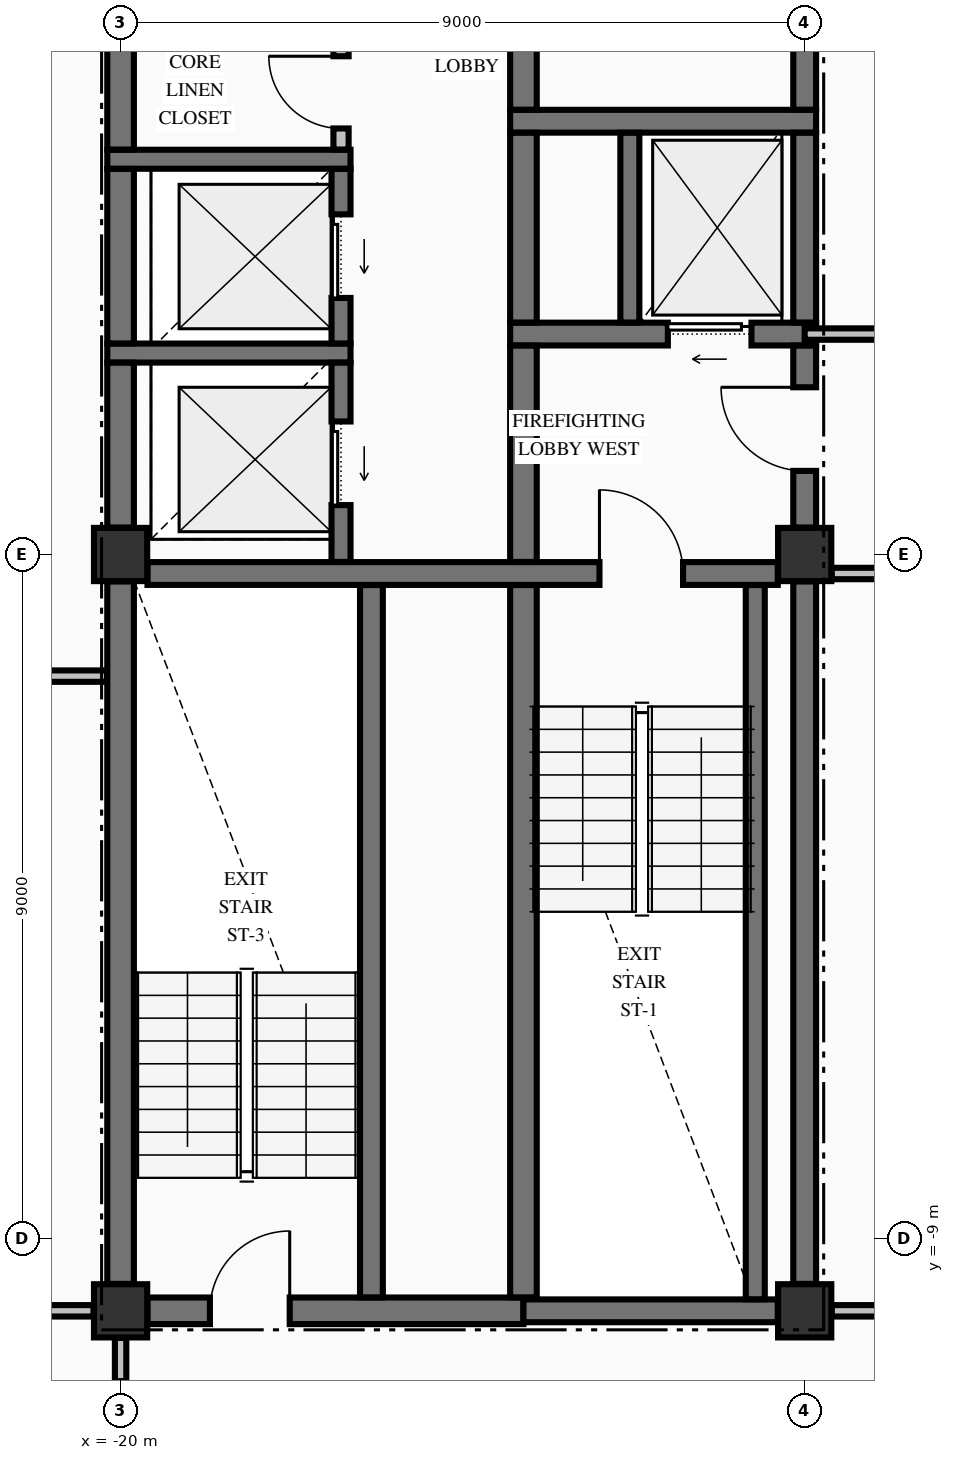
"""IFC4 building model, lengths in metres.
Left out: names, types, materials, properties, quantities, classifications, styles, units other than length and angle.
Written with IfcOpenShell. Run it as: python <this file> out.ifc"""

import sys

from ifc_helpers import new_model, si_unit, direction, frame, frame_2d, origin, origin_2d, place, context, subcontext, project, spatial, rectangle, extrude, element, fill, save


model = new_model("IFC4")
c1 = context("Model", 3, precision=1e-05, world=origin(), true_north=direction((0.0, 1.0)))
c2 = subcontext(c1, "Body", "Model", "MODEL_VIEW")
j1 = project(units=[si_unit("LENGTHUNIT", "METRE"), si_unit("PLANEANGLEUNIT", "RADIAN")], contexts=[c1])
p1 = place(None, origin())
s1 = spatial("IfcSite", under=j1, at=p1, CompositionType="ELEMENT")
p2 = place(p1, origin())
s2 = spatial("IfcBuilding", under=s1, at=p2, CompositionType="ELEMENT")
p3 = place(p2, frame((0.0, 0.0, 257.66)))
s3 = spatial("IfcBuildingStorey", under=s2, at=p3, CompositionType="ELEMENT", Elevation=257.66)
for number, where, z_axis, x_axis in (
    (1, (-20.0, -9.95, -0.25), (0.0, 0.0, 1.0), (1.0, 0.0, 0.0)),
    (2, (-11.0, -9.95, -0.25), (0.0, 0.0, 1.0), (1.0, 0.0, 0.0)),
    (3, (-11.0, 0.0, -0.25), (0.0, 0.0, 1.0), (1.0, 0.0, 0.0)),
    (4, (-20.0, 0.0, -0.25), (0.0, 0.0, 1.0), (1.0, 0.0, 0.0)),
):
    element("IfcColumn", number, at=place(p3, frame(where, z_axis=z_axis, x_axis=x_axis)), inside=s3, PredefinedType="COLUMN", context=c2, shape_type="SweptSolid", body=[
        extrude(rectangle(XDim=0.7, YDim=0.7, at=origin_2d()), origin(), (0.0, 0.0, 1.0), 3.23),
    ])
p4 = place(p3, frame((-19.646, -9.95, 0.0), z_axis=(0.0, 0.0, 1.0), x_axis=(1.0, 0.0, 0.0)))
e5 = element("IfcWall", 5, at=p4, inside=s3, PredefinedType="SHEAR", context=c2, shape_type="SweptSolid", body=[
    extrude(rectangle(XDim=4.946, YDim=0.35, at=frame_2d((2.473, 0.0))), origin(), (0.0, 0.0, 1.0), 2.98),
])
p5 = place(p4, frame((0.821, 0.0, 0.0)))
e6 = element("IfcOpeningElement", 6, at=p5, cuts=e5, PredefinedType="OPENING", context=c2, shape_type="SweptSolid", body=[
    extrude(rectangle(XDim=1.05, YDim=2.15, at=frame_2d((0.525, 1.075))), frame((0.0, 0.185, 0.0), z_axis=(0.0, -1.0, 0.0), x_axis=(1.0, 0.0, 0.0)), (0.0, 0.0, 1.0), 0.37),
])
p6 = place(p3, frame((-14.7, -9.95, 0.0), z_axis=(0.0, 0.0, 1.0), x_axis=(1.0, 0.0, 0.0)))
e7 = element("IfcWall", 7, at=p6, inside=s3, PredefinedType="SHEAR", context=c2, shape_type="SweptSolid", body=[
    extrude(rectangle(XDim=3.346, YDim=0.3, at=frame_2d((1.673, 0.0))), origin(), (0.0, 0.0, 1.0), 2.98),
])
p7 = place(p3, frame((-19.646, -0.25, 0.0), z_axis=(0.0, 0.0, 1.0), x_axis=(1.0, 0.0, 0.0)))
e8 = element("IfcWall", 8, at=p7, inside=s3, PredefinedType="SHEAR", context=c2, shape_type="SweptSolid", body=[
    extrude(rectangle(XDim=8.292, YDim=0.3, at=frame_2d((4.146, 0.0))), origin(), (0.0, 0.0, 1.0), 2.98),
])
p8 = place(p7, frame((5.946, 0.0, 0.0)))
e9 = element("IfcOpeningElement", 9, at=p8, cuts=e8, PredefinedType="OPENING", context=c2, shape_type="SweptSolid", body=[
    extrude(rectangle(XDim=1.1, YDim=2.15, at=frame_2d((0.55, 1.075))), frame((0.0, 0.16, 0.0), z_axis=(0.0, -1.0, 0.0), x_axis=(1.0, 0.0, 0.0)), (0.0, 0.0, 1.0), 0.32),
])
p9 = place(p3, frame((-20.175, 2.65, 0.0), z_axis=(0.0, 0.0, 1.0), x_axis=(1.0, 0.0, 0.0)))
e10 = element("IfcWall", 10, at=p9, inside=s3, PredefinedType="SOLIDWALL", context=c2, shape_type="SweptSolid", body=[
    extrude(rectangle(XDim=3.2, YDim=0.25, at=frame_2d((1.6, 0.0))), origin(), (0.0, 0.0, 1.0), 2.98),
])
p10 = place(p3, frame((-14.875, 2.9, 0.0), z_axis=(0.0, 0.0, 1.0), x_axis=(1.0, 0.0, 0.0)))
e11 = element("IfcWall", 11, at=p10, inside=s3, PredefinedType="SHEAR", context=c2, shape_type="SweptSolid", body=[
    extrude(rectangle(XDim=4.025, YDim=0.3, at=frame_2d((2.012, 0.0))), origin(), (0.0, 0.0, 1.0), 2.98),
])
p11 = place(p10, frame((2.075, 0.0, 0.0)))
e12 = element("IfcOpeningElement", 12, at=p11, cuts=e11, PredefinedType="OPENING", context=c2, shape_type="SweptSolid", body=[
    extrude(rectangle(XDim=1.1, YDim=2.2, at=frame_2d((0.55, 1.1))), frame((0.0, 0.16, 0.0), z_axis=(0.0, -1.0, 0.0), x_axis=(1.0, 0.0, 0.0)), (0.0, 0.0, 1.0), 0.32),
])
p12 = place(p3, frame((-20.175, 5.2, 0.0), z_axis=(0.0, 0.0, 1.0), x_axis=(1.0, 0.0, 0.0)))
e13 = element("IfcWall", 13, at=p12, inside=s3, PredefinedType="SOLIDWALL", context=c2, shape_type="SweptSolid", body=[
    extrude(rectangle(XDim=3.2, YDim=0.25, at=frame_2d((1.6, 0.0))), origin(), (0.0, 0.0, 1.0), 2.98),
])
p13 = place(p3, frame((-14.875, 5.7, 0.0), z_axis=(0.0, 0.0, 1.0), x_axis=(1.0, 0.0, 0.0)))
e14 = element("IfcWall", 14, at=p13, inside=s3, PredefinedType="SHEAR", context=c2, shape_type="SweptSolid", body=[
    extrude(rectangle(XDim=4.025, YDim=0.3, at=frame_2d((2.012, 0.0))), origin(), (0.0, 0.0, 1.0), 2.98),
])
p14 = place(p3, frame((-25.835, -9.95, 0.0), z_axis=(0.0, 0.0, 1.0), x_axis=(1.0, 0.0, 0.0)))
e15 = element("IfcWall", 15, at=p14, inside=s3, PredefinedType="PARTITIONING", context=c2, shape_type="SweptSolid", body=[
    extrude(rectangle(XDim=5.479, YDim=0.15, at=frame_2d((2.74, 0.0))), origin(), (0.0, 0.0, 1.0), 2.98),
])
p15 = place(p14, frame((2.36, 0.0, 0.0)))
e16 = element("IfcOpeningElement", 16, at=p15, cuts=e15, PredefinedType="OPENING", context=c2, shape_type="SweptSolid", body=[
    extrude(rectangle(XDim=0.95, YDim=2.15, at=frame_2d((0.475, 1.075))), frame((0.0, 0.085, 0.0), z_axis=(0.0, -1.0, 0.0), x_axis=(1.0, 0.0, 0.0)), (0.0, 0.0, 1.0), 0.17),
])
p16 = place(p3, frame((-10.644, -9.95, 0.0), z_axis=(0.0, 0.0, 1.0), x_axis=(1.0, 0.0, 0.0)))
e17 = element("IfcWall", 17, at=p16, inside=s3, PredefinedType="PARTITIONING", context=c2, shape_type="SweptSolid", body=[
    extrude(rectangle(XDim=21.288, YDim=0.15, at=frame_2d((10.644, 0.0))), origin(), (0.0, 0.0, 1.0), 2.98),
])
p17 = place(p16, frame((12.744, 0.0, 0.0)))
e18 = element("IfcOpeningElement", 18, at=p17, cuts=e17, PredefinedType="OPENING", context=c2, shape_type="SweptSolid", body=[
    extrude(rectangle(XDim=1.1, YDim=2.15, at=frame_2d((0.55, 1.075))), frame((0.0, 0.085, 0.0), z_axis=(0.0, -1.0, 0.0), x_axis=(1.0, 0.0, 0.0)), (0.0, 0.0, 1.0), 0.17),
])
p18 = place(p16, frame((18.949, 0.0, 0.0)))
e19 = element("IfcOpeningElement", 19, at=p18, cuts=e17, PredefinedType="OPENING", context=c2, shape_type="SweptSolid", body=[
    extrude(rectangle(XDim=0.95, YDim=2.15, at=frame_2d((0.475, 1.075))), frame((0.0, 0.085, 0.0), z_axis=(0.0, -1.0, 0.0), x_axis=(1.0, 0.0, 0.0)), (0.0, 0.0, 1.0), 0.17),
])
p19 = place(p3, frame((-25.835, -1.6, 0.0), z_axis=(0.0, 0.0, 1.0), x_axis=(1.0, 0.0, 0.0)))
e20 = element("IfcWall", 20, at=p19, inside=s3, PredefinedType="PARTITIONING", context=c2, shape_type="SweptSolid", body=[
    extrude(rectangle(XDim=5.657, YDim=0.15, at=frame_2d((2.829, 0.0))), origin(), (0.0, 0.0, 1.0), 2.98),
])
p20 = place(p3, frame((-10.644, -0.25, 0.0), z_axis=(0.0, 0.0, 1.0), x_axis=(1.0, 0.0, 0.0)))
e21 = element("IfcWall", 21, at=p20, inside=s3, PredefinedType="PARTITIONING", context=c2, shape_type="SweptSolid", body=[
    extrude(rectangle(XDim=21.288, YDim=0.15, at=frame_2d((10.644, 0.0))), origin(), (0.0, 0.0, 1.0), 2.98),
])
p21 = place(p20, frame((12.744, 0.0, 0.0)))
e22 = element("IfcOpeningElement", 22, at=p21, cuts=e21, PredefinedType="OPENING", context=c2, shape_type="SweptSolid", body=[
    extrude(rectangle(XDim=1.1, YDim=2.15, at=frame_2d((0.55, 1.075))), frame((0.0, 0.085, 0.0), z_axis=(0.0, -1.0, 0.0), x_axis=(1.0, 0.0, 0.0)), (0.0, 0.0, 1.0), 0.17),
])
p22 = place(p20, frame((5.399, 0.0, 0.0)))
e23 = element("IfcOpeningElement", 23, at=p22, cuts=e21, PredefinedType="OPENING", context=c2, shape_type="SweptSolid", body=[
    extrude(rectangle(XDim=1.05, YDim=2.15, at=frame_2d((0.525, 1.075))), frame((0.0, 0.085, 0.0), z_axis=(0.0, -1.0, 0.0), x_axis=(1.0, 0.0, 0.0)), (0.0, 0.0, 1.0), 0.17),
])
p23 = place(p20, frame((17.549, 0.0, 0.0)))
e24 = element("IfcOpeningElement", 24, at=p23, cuts=e21, PredefinedType="OPENING", context=c2, shape_type="SweptSolid", body=[
    extrude(rectangle(XDim=0.95, YDim=2.15, at=frame_2d((0.475, 1.075))), frame((0.0, 0.085, 0.0), z_axis=(0.0, -1.0, 0.0), x_axis=(1.0, 0.0, 0.0)), (0.0, 0.0, 1.0), 0.17),
])
p24 = place(p3, frame((-11.0, 2.9, 0.0), z_axis=(0.0, 0.0, 1.0), x_axis=(1.0, 0.0, 0.0)))
e25 = element("IfcWall", 25, at=p24, inside=s3, PredefinedType="PARTITIONING", context=c2, shape_type="SweptSolid", body=[
    extrude(rectangle(XDim=22.0, YDim=0.15, at=frame_2d((11.0, 0.0))), origin(), (0.0, 0.0, 1.0), 2.98),
])
p25 = place(p24, frame((13.1, 0.0, 0.0)))
e26 = element("IfcOpeningElement", 26, at=p25, cuts=e25, PredefinedType="OPENING", context=c2, shape_type="SweptSolid", body=[
    extrude(rectangle(XDim=1.1, YDim=2.15, at=frame_2d((0.55, 1.075))), frame((0.0, 0.085, 0.0), z_axis=(0.0, -1.0, 0.0), x_axis=(1.0, 0.0, 0.0)), (0.0, 0.0, 1.0), 0.17),
])
p26 = place(p24, frame((5.755, 0.0, 0.0)))
e27 = element("IfcOpeningElement", 27, at=p26, cuts=e25, PredefinedType="OPENING", context=c2, shape_type="SweptSolid", body=[
    extrude(rectangle(XDim=1.05, YDim=2.15, at=frame_2d((0.525, 1.075))), frame((0.0, 0.085, 0.0), z_axis=(0.0, -1.0, 0.0), x_axis=(1.0, 0.0, 0.0)), (0.0, 0.0, 1.0), 0.17),
])
p27 = place(p24, frame((17.83, 0.0, 0.0)))
e28 = element("IfcOpeningElement", 28, at=p27, cuts=e25, PredefinedType="OPENING", context=c2, shape_type="SweptSolid", body=[
    extrude(rectangle(XDim=1.1, YDim=2.15, at=frame_2d((0.55, 1.075))), frame((0.0, 0.085, 0.0), z_axis=(0.0, -1.0, 0.0), x_axis=(1.0, 0.0, 0.0)), (0.0, 0.0, 1.0), 0.17),
])
p28 = place(p3, frame((-20.0, -9.596, 0.0), z_axis=(0.0, 0.0, 1.0), x_axis=(0.0, 1.0, 0.0)))
e29 = element("IfcWall", 29, at=p28, inside=s3, PredefinedType="SHEAR", context=c2, shape_type="SweptSolid", body=[
    extrude(rectangle(XDim=9.242, YDim=0.35, at=frame_2d((4.621, 0.0))), origin(), (0.0, 0.0, 1.0), 2.98),
])
p29 = place(p3, frame((-20.0, 0.354, 0.0), z_axis=(0.0, 0.0, 1.0), x_axis=(0.0, 1.0, 0.0)))
e30 = element("IfcWall", 30, at=p29, inside=s3, PredefinedType="SHEAR", context=c2, shape_type="SweptSolid", body=[
    extrude(rectangle(XDim=2.169, YDim=0.35, at=frame_2d((1.084, 0.0))), origin(), (0.0, 0.0, 1.0), 2.98),
])
p30 = place(p3, frame((-20.0, 2.777, 0.0), z_axis=(0.0, 0.0, 1.0), x_axis=(0.0, 1.0, 0.0)))
e31 = element("IfcWall", 31, at=p30, inside=s3, PredefinedType="SHEAR", context=c2, shape_type="SweptSolid", body=[
    extrude(rectangle(XDim=2.296, YDim=0.35, at=frame_2d((1.148, 0.0))), origin(), (0.0, 0.0, 1.0), 2.98),
])
p31 = place(p3, frame((-20.0, 5.327, 0.0), z_axis=(0.0, 0.0, 1.0), x_axis=(0.0, 1.0, 0.0)))
e32 = element("IfcWall", 32, at=p31, inside=s3, PredefinedType="SHEAR", context=c2, shape_type="SweptSolid", body=[
    extrude(rectangle(XDim=4.819, YDim=0.35, at=frame_2d((2.41, 0.0))), origin(), (0.0, 0.0, 1.0), 2.98),
])
p32 = place(p3, frame((-17.1, -0.098, 0.0), z_axis=(0.0, 0.0, 1.0), x_axis=(0.0, 1.0, 0.0)))
e33 = element("IfcWall", 33, at=p32, inside=s3, PredefinedType="SOLIDWALL", context=c2, shape_type="SweptSolid", body=[
    extrude(rectangle(XDim=2.621, YDim=0.25, at=frame_2d((1.311, 0.0))), origin(), (0.0, 0.0, 1.0), 2.98),
])
p33 = place(p32, frame((0.748, 0.0, 0.0)))
e34 = element("IfcOpeningElement", 34, at=p33, cuts=e33, PredefinedType="OPENING", context=c2, shape_type="SweptSolid", body=[
    extrude(rectangle(XDim=1.1, YDim=2.2, at=frame_2d((0.55, 1.1))), frame((0.0, 0.135, 0.0), z_axis=(0.0, -1.0, 0.0), x_axis=(1.0, 0.0, 0.0)), (0.0, 0.0, 1.0), 0.27),
])
p34 = place(p3, frame((-17.1, 2.777, 0.0), z_axis=(0.0, 0.0, 1.0), x_axis=(0.0, 1.0, 0.0)))
e35 = element("IfcWall", 35, at=p34, inside=s3, PredefinedType="SOLIDWALL", context=c2, shape_type="SweptSolid", body=[
    extrude(rectangle(XDim=2.296, YDim=0.25, at=frame_2d((1.148, 0.0))), origin(), (0.0, 0.0, 1.0), 2.98),
])
p35 = place(p34, frame((0.598, 0.0, 0.0)))
e36 = element("IfcOpeningElement", 36, at=p35, cuts=e35, PredefinedType="OPENING", context=c2, shape_type="SweptSolid", body=[
    extrude(rectangle(XDim=1.1, YDim=2.2, at=frame_2d((0.55, 1.1))), frame((0.0, 0.135, 0.0), z_axis=(0.0, -1.0, 0.0), x_axis=(1.0, 0.0, 0.0)), (0.0, 0.0, 1.0), 0.27),
])
p36 = place(p3, frame((-16.7, -9.773, 0.0), z_axis=(0.0, 0.0, 1.0), x_axis=(0.0, 1.0, 0.0)))
e37 = element("IfcWall", 37, at=p36, inside=s3, PredefinedType="SHEAR", context=c2, shape_type="SweptSolid", body=[
    extrude(rectangle(XDim=9.371, YDim=0.3, at=frame_2d((4.686, 0.0))), origin(), (0.0, 0.0, 1.0), 2.98),
])
p37 = place(p3, frame((-14.7, -9.773, 0.0), z_axis=(0.0, 0.0, 1.0), x_axis=(0.0, 1.0, 0.0)))
e38 = element("IfcWall", 38, at=p37, inside=s3, PredefinedType="SHEAR", context=c2, shape_type="SweptSolid", body=[
    extrude(rectangle(XDim=9.371, YDim=0.35, at=frame_2d((4.686, 0.0))), origin(), (0.0, 0.0, 1.0), 2.98),
])
p38 = place(p3, frame((-14.7, -0.098, 0.0), z_axis=(0.0, 0.0, 1.0), x_axis=(0.0, 1.0, 0.0)))
e39 = element("IfcWall", 39, at=p38, inside=s3, PredefinedType="SHEAR", context=c2, shape_type="SweptSolid", body=[
    extrude(rectangle(XDim=2.846, YDim=0.35, at=frame_2d((1.423, 0.0))), origin(), (0.0, 0.0, 1.0), 2.98),
])
p39 = place(p3, frame((-14.7, 3.052, 0.0), z_axis=(0.0, 0.0, 1.0), x_axis=(0.0, 1.0, 0.0)))
e40 = element("IfcWall", 40, at=p39, inside=s3, PredefinedType="SHEAR", context=c2, shape_type="SweptSolid", body=[
    extrude(rectangle(XDim=2.496, YDim=0.35, at=frame_2d((1.248, 0.0))), origin(), (0.0, 0.0, 1.0), 2.98),
])
p40 = place(p3, frame((-14.7, 5.852, 0.0), z_axis=(0.0, 0.0, 1.0), x_axis=(0.0, 1.0, 0.0)))
e41 = element("IfcWall", 41, at=p40, inside=s3, PredefinedType="SHEAR", context=c2, shape_type="SweptSolid", body=[
    extrude(rectangle(XDim=4.471, YDim=0.35, at=frame_2d((2.235, 0.0))), origin(), (0.0, 0.0, 1.0), 2.98),
])
p41 = place(p3, frame((-13.3, 3.052, 0.0), z_axis=(0.0, 0.0, 1.0), x_axis=(0.0, 1.0, 0.0)))
e42 = element("IfcWall", 42, at=p41, inside=s3, PredefinedType="SOLIDWALL", context=c2, shape_type="SweptSolid", body=[
    extrude(rectangle(XDim=2.496, YDim=0.25, at=frame_2d((1.248, 0.0))), origin(), (0.0, 0.0, 1.0), 2.98),
])
p42 = place(p3, frame((-11.65, -9.798, 0.0), z_axis=(0.0, 0.0, 1.0), x_axis=(0.0, 1.0, 0.0)))
e43 = element("IfcWall", 43, at=p42, inside=s3, PredefinedType="SOLIDWALL", context=c2, shape_type="SweptSolid", body=[
    extrude(rectangle(XDim=9.396, YDim=0.25, at=frame_2d((4.698, 0.0))), origin(), (0.0, 0.0, 1.0), 2.98),
])
p43 = place(p3, frame((-11.0, -9.596, 0.0), z_axis=(0.0, 0.0, 1.0), x_axis=(0.0, 1.0, 0.0)))
e44 = element("IfcWall", 44, at=p43, inside=s3, PredefinedType="SHEAR", context=c2, shape_type="SweptSolid", body=[
    extrude(rectangle(XDim=9.242, YDim=0.3, at=frame_2d((4.621, 0.0))), origin(), (0.0, 0.0, 1.0), 2.98),
])
p44 = place(p3, frame((-11.0, 0.354, 0.0), z_axis=(0.0, 0.0, 1.0), x_axis=(0.0, 1.0, 0.0)))
e45 = element("IfcWall", 45, at=p44, inside=s3, PredefinedType="SHEAR", context=c2, shape_type="SweptSolid", body=[
    extrude(rectangle(XDim=2.394, YDim=0.3, at=frame_2d((1.197, 0.0))), origin(), (0.0, 0.0, 1.0), 2.98),
])
p45 = place(p44, frame((0.746, 0.0, 0.0)))
e46 = element("IfcOpeningElement", 46, at=p45, cuts=e45, PredefinedType="OPENING", context=c2, shape_type="SweptSolid", body=[
    extrude(rectangle(XDim=1.1, YDim=2.15, at=frame_2d((0.55, 1.075))), frame((0.0, 0.16, 0.0), z_axis=(0.0, -1.0, 0.0), x_axis=(1.0, 0.0, 0.0)), (0.0, 0.0, 1.0), 0.32),
])
p46 = place(p3, frame((-11.0, 3.052, 0.0), z_axis=(0.0, 0.0, 1.0), x_axis=(0.0, 1.0, 0.0)))
e47 = element("IfcWall", 47, at=p46, inside=s3, PredefinedType="SHEAR", context=c2, shape_type="SweptSolid", body=[
    extrude(rectangle(XDim=2.496, YDim=0.3, at=frame_2d((1.248, 0.0))), origin(), (0.0, 0.0, 1.0), 2.98),
])
p47 = place(p3, frame((-11.0, 5.852, 0.0), z_axis=(0.0, 0.0, 1.0), x_axis=(0.0, 1.0, 0.0)))
e48 = element("IfcWall", 48, at=p47, inside=s3, PredefinedType="SHEAR", context=c2, shape_type="SweptSolid", body=[
    extrude(rectangle(XDim=4.294, YDim=0.3, at=frame_2d((2.147, 0.0))), origin(), (0.0, 0.0, 1.0), 2.98),
])
p48 = place(p3, frame((-20.0, -12.672, 0.0), z_axis=(0.0, 0.0, 1.0), x_axis=(0.0, 1.0, 0.0)))
e49 = element("IfcWall", 49, at=p48, inside=s3, PredefinedType="PARTITIONING", context=c2, shape_type="SweptSolid", body=[
    extrude(rectangle(XDim=2.366, YDim=0.15, at=frame_2d((1.183, 0.0))), origin(), (0.0, 0.0, 1.0), 2.98),
])
p49 = place(p48, frame((0.847, 0.0, 0.0)))
e50 = element("IfcOpeningElement", 50, at=p49, cuts=e49, PredefinedType="OPENING", context=c2, shape_type="SweptSolid", body=[
    extrude(rectangle(XDim=0.95, YDim=2.15, at=frame_2d((0.475, 1.075))), frame((0.0, 0.085, 0.0), z_axis=(0.0, -1.0, 0.0), x_axis=(1.0, 0.0, 0.0)), (0.0, 0.0, 1.0), 0.17),
])
p50 = place(p3, frame((-17.1, 5.328, 0.0), z_axis=(0.0, 0.0, 1.0), x_axis=(0.0, 1.0, 0.0)))
e51 = element("IfcWall", 51, at=p50, inside=s3, PredefinedType="PARTITIONING", context=c2, shape_type="SweptSolid", body=[
    extrude(rectangle(XDim=1.544, YDim=0.2, at=frame_2d((0.772, 0.0))), origin(), (0.0, 0.0, 1.0), 2.98),
])
p51 = place(p50, frame((0.277, 0.0, 0.0)))
e52 = element("IfcOpeningElement", 52, at=p51, cuts=e51, PredefinedType="OPENING", context=c2, shape_type="SweptSolid", body=[
    extrude(rectangle(XDim=0.95, YDim=2.15, at=frame_2d((0.475, 1.075))), frame((0.0, 0.11, 0.0), z_axis=(0.0, -1.0, 0.0), x_axis=(1.0, 0.0, 0.0)), (0.0, 0.0, 1.0), 0.22),
])
p52 = place(p8, origin())
e53 = element("IfcDoor", 53, at=p52, inside=s3, OperationType="SINGLE_SWING_LEFT", PredefinedType="DOOR", context=c2, shape_type="SweptSolid", body=[
    extrude(rectangle(XDim=1.1, YDim=2.15, at=frame_2d((0.55, 1.075))), frame((0.0, 0.025, 0.0), z_axis=(0.0, -1.0, 0.0), x_axis=(1.0, 0.0, 0.0)), (0.0, 0.0, 1.0), 0.05),
])
fill(e9, e53)
p53 = place(p45, origin())
e54 = element("IfcDoor", 54, at=p53, inside=s3, OperationType="SINGLE_SWING_RIGHT", PredefinedType="DOOR", context=c2, shape_type="SweptSolid", body=[
    extrude(rectangle(XDim=1.1, YDim=2.15, at=frame_2d((0.55, 1.075))), frame((0.0, 0.025, 0.0), z_axis=(0.0, -1.0, 0.0), x_axis=(1.0, 0.0, 0.0)), (0.0, 0.0, 1.0), 0.05),
])
fill(e46, e54)
p54 = place(p11, origin())
e55 = element("IfcDoor", 55, at=p54, inside=s3, OperationType="SLIDING_TO_LEFT", PredefinedType="DOOR", context=c2, shape_type="SweptSolid", body=[
    extrude(rectangle(XDim=1.1, YDim=2.2, at=frame_2d((0.55, 1.1))), frame((0.0, 0.025, 0.0), z_axis=(0.0, -1.0, 0.0), x_axis=(1.0, 0.0, 0.0)), (0.0, 0.0, 1.0), 0.05),
])
fill(e12, e55)
p55 = place(p5, origin())
e56 = element("IfcDoor", 56, at=p55, inside=s3, OperationType="SINGLE_SWING_RIGHT", PredefinedType="DOOR", context=c2, shape_type="SweptSolid", body=[
    extrude(rectangle(XDim=1.05, YDim=2.15, at=frame_2d((0.525, 1.075))), frame((0.0, 0.025, 0.0), z_axis=(0.0, -1.0, 0.0), x_axis=(1.0, 0.0, 0.0)), (0.0, 0.0, 1.0), 0.05),
])
fill(e6, e56)
p56 = place(p33, origin())
e57 = element("IfcDoor", 57, at=p56, inside=s3, OperationType="SLIDING_TO_LEFT", PredefinedType="DOOR", context=c2, shape_type="SweptSolid", body=[
    extrude(rectangle(XDim=1.1, YDim=2.2, at=frame_2d((0.55, 1.1))), frame((0.0, 0.025, 0.0), z_axis=(0.0, -1.0, 0.0), x_axis=(1.0, 0.0, 0.0)), (0.0, 0.0, 1.0), 0.05),
])
fill(e34, e57)
p57 = place(p35, origin())
e58 = element("IfcDoor", 58, at=p57, inside=s3, OperationType="SLIDING_TO_LEFT", PredefinedType="DOOR", context=c2, shape_type="SweptSolid", body=[
    extrude(rectangle(XDim=1.1, YDim=2.2, at=frame_2d((0.55, 1.1))), frame((0.0, 0.025, 0.0), z_axis=(0.0, -1.0, 0.0), x_axis=(1.0, 0.0, 0.0)), (0.0, 0.0, 1.0), 0.05),
])
fill(e36, e58)
p58 = place(p51, origin())
e59 = element("IfcDoor", 59, at=p58, inside=s3, OperationType="SINGLE_SWING_RIGHT", PredefinedType="DOOR", context=c2, shape_type="SweptSolid", body=[
    extrude(rectangle(XDim=0.95, YDim=2.15, at=frame_2d((0.475, 1.075))), frame((0.0, 0.025, 0.0), z_axis=(0.0, -1.0, 0.0), x_axis=(1.0, 0.0, 0.0)), (0.0, 0.0, 1.0), 0.05),
])
fill(e52, e59)
save(model, sys.argv[1])
